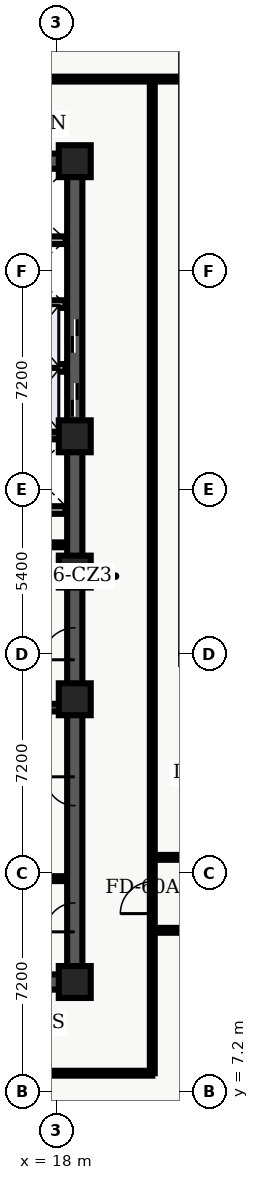
"""IFC4 building model, lengths in metres.
Left out: names, types, materials, properties, quantities, classifications, styles, units other than length and angle.
Written with IfcOpenShell. Run it as: python <this file> out.ifc"""

import sys

from ifc_helpers import new_model, entity, si_unit, converted_unit, direction, frame, origin_with_axes, origin_2d_with_axis, place, context, subcontext, project, spatial, polyline, rectangle, outline, extrude, element, fill, save


model = new_model("IFC4")
c1 = context("Model", 3, precision=1e-05, world=origin_with_axes(), true_north=direction((0.0, 1.0)))
c2 = subcontext(c1, "Body", "Model", "MODEL_VIEW")
j1 = project(units=[si_unit("LENGTHUNIT", "METRE"), converted_unit("PLANEANGLEUNIT", "DEGREE", entity("IfcPlaneAngleMeasure", 0.017), si_unit("PLANEANGLEUNIT", "RADIAN"), dimensions=[0, 0, 0, 0, 0, 0, 0])], contexts=[c1])
p1 = place(None, origin_with_axes())
s1 = spatial("IfcSite", under=j1, at=p1, CompositionType="ELEMENT")
p2 = place(p1, origin_with_axes())
s2 = spatial("IfcBuilding", under=s1, at=p2, CompositionType="ELEMENT")
p3 = place(p2, frame((0.0, 0.0, 148.5), z_axis=(0.0, 0.0, 1.0), x_axis=(1.0, 0.0, 0.0)))
s3 = spatial("IfcBuildingStorey", under=s2, at=p3, CompositionType="ELEMENT", Elevation=148.5)
p4 = place(p3, frame((11.4, 10.8, 0.0), z_axis=(0.0, 0.0, 1.0), x_axis=(1.0, 0.0, 0.0)))
e1 = element("IfcWall", 1, at=p4, inside=s3, PredefinedType="SHEAR", context=c2, shape_type="SweptSolid", body=[
    extrude(outline(polyline([(0.0, -0.25), (7.2, -0.25), (7.2, 0.25), (0.0, 0.25), (0.0, -0.25)])), origin_with_axes(), (0.0, 0.0, 1.0), 3.66),
])
p5 = place(p4, frame((2.625, 0.0, 0.0), z_axis=(0.0, 0.0, 1.0), x_axis=(1.0, 0.0, 0.0)))
e2 = element("IfcOpeningElement", 2, at=p5, cuts=e1, PredefinedType="OPENING", context=c2, shape_type="SweptSolid", body=[
    extrude(rectangle(XDim=1.05, YDim=0.52, at=origin_2d_with_axis()), origin_with_axes(), (0.0, 0.0, 1.0), 2.15),
])
p6 = place(p3, frame((11.4, 37.8, 0.0), z_axis=(0.0, 0.0, 1.0), x_axis=(1.0, 0.0, 0.0)))
e3 = element("IfcWall", 3, at=p6, inside=s3, PredefinedType="SHEAR", context=c2, shape_type="SweptSolid", body=[
    extrude(outline(polyline([(0.0, -0.25), (7.2, -0.25), (7.2, 0.25), (0.0, 0.25), (0.0, -0.25)])), origin_with_axes(), (0.0, 0.0, 1.0), 3.66),
])
p7 = place(p6, frame((2.625, 0.0, 0.0), z_axis=(0.0, 0.0, 1.0), x_axis=(1.0, 0.0, 0.0)))
e4 = element("IfcOpeningElement", 4, at=p7, cuts=e3, PredefinedType="OPENING", context=c2, shape_type="SweptSolid", body=[
    extrude(rectangle(XDim=1.05, YDim=0.52, at=origin_2d_with_axis()), origin_with_axes(), (0.0, 0.0, 1.0), 2.15),
])
p8 = place(p3, frame((18.6, 10.8, 0.0), z_axis=(0.0, 0.0, 1.0), x_axis=(0.0, 1.0, 0.0)))
e5 = element("IfcWall", 5, at=p8, inside=s3, PredefinedType="SHEAR", context=c2, shape_type="SweptSolid", body=[
    extrude(outline(polyline([(0.0, -0.25), (13.5, -0.25), (13.5, 0.25), (0.0, 0.25), (0.0, -0.25)])), origin_with_axes(), (0.0, 0.0, 1.0), 3.66),
])
p9 = place(p8, frame((11.125, 0.0, 0.0), z_axis=(0.0, 0.0, 1.0), x_axis=(1.0, 0.0, 0.0)))
e6 = element("IfcOpeningElement", 6, at=p9, cuts=e5, PredefinedType="OPENING", context=c2, shape_type="SweptSolid", body=[
    extrude(rectangle(XDim=1.05, YDim=0.52, at=origin_2d_with_axis()), origin_with_axes(), (0.0, 0.0, 1.0), 2.15),
])
p10 = place(p8, frame((2.125, 0.0, 0.0), z_axis=(0.0, 0.0, 1.0), x_axis=(1.0, 0.0, 0.0)))
e7 = element("IfcOpeningElement", 7, at=p10, cuts=e5, PredefinedType="OPENING", context=c2, shape_type="SweptSolid", body=[
    extrude(rectangle(XDim=0.95, YDim=0.52, at=origin_2d_with_axis()), origin_with_axes(), (0.0, 0.0, 1.0), 2.15),
])
p11 = place(p8, frame((6.275, 0.0, 0.0), z_axis=(0.0, 0.0, 1.0), x_axis=(1.0, 0.0, 0.0)))
e8 = element("IfcOpeningElement", 8, at=p11, cuts=e5, PredefinedType="OPENING", context=c2, shape_type="SweptSolid", body=[
    extrude(rectangle(XDim=0.95, YDim=0.52, at=origin_2d_with_axis()), origin_with_axes(), (0.0, 0.0, 1.0), 2.15),
])
p12 = place(p3, frame((18.6, 24.3, 0.0), z_axis=(0.0, 0.0, 1.0), x_axis=(0.0, 1.0, 0.0)))
e9 = element("IfcWall", 9, at=p12, inside=s3, PredefinedType="SHEAR", context=c2, shape_type="SweptSolid", body=[
    extrude(outline(polyline([(0.0, -0.25), (13.5, -0.25), (13.5, 0.25), (0.0, 0.25), (0.0, -0.25)])), origin_with_axes(), (0.0, 0.0, 1.0), 3.66),
])
p13 = place(p12, frame((5.65, 0.0, 0.0), z_axis=(0.0, 0.0, 1.0), x_axis=(1.0, 0.0, 0.0)))
e10 = element("IfcOpeningElement", 10, at=p13, cuts=e9, PredefinedType="OPENING", context=c2, shape_type="SweptSolid", body=[
    extrude(rectangle(XDim=1.1, YDim=0.52, at=origin_2d_with_axis()), origin_with_axes(), (0.0, 0.0, 1.0), 2.15),
])
p14 = place(p12, frame((7.75, 0.0, 0.0), z_axis=(0.0, 0.0, 1.0), x_axis=(1.0, 0.0, 0.0)))
e11 = element("IfcOpeningElement", 11, at=p14, cuts=e9, PredefinedType="OPENING", context=c2, shape_type="SweptSolid", body=[
    extrude(rectangle(XDim=1.1, YDim=0.52, at=origin_2d_with_axis()), origin_with_axes(), (0.0, 0.0, 1.0), 2.15),
])
for number, where, z_axis, x_axis in (
    (12, (11.65, 19.825, 0.0), (0.0, 0.0, 1.0), (1.0, 0.0, 0.0)),
    (13, (11.65, 28.775, 0.0), (0.0, 0.0, 1.0), (1.0, 0.0, 0.0)),
):
    element("IfcWall", number, at=place(p3, frame(where, z_axis=z_axis, x_axis=x_axis)), inside=s3, PredefinedType="SHEAR", context=c2, shape_type="SweptSolid", body=[
        extrude(outline(polyline([(0.0, -0.125), (6.7, -0.125), (6.7, 0.125), (0.0, 0.125), (0.0, -0.125)])), origin_with_axes(), (0.0, 0.0, 1.0), 3.66),
    ])
p15 = place(p3, frame((11.7, 24.1, 0.0), z_axis=(0.0, 0.0, 1.0), x_axis=(1.0, 0.0, 0.0)))
e14 = element("IfcWall", 14, at=p15, inside=s3, PredefinedType="SOLIDWALL", context=c2, shape_type="SweptSolid", body=[
    extrude(outline(polyline([(0.0, -0.125), (6.6, -0.125), (6.6, 0.125), (0.0, 0.125), (0.0, -0.125)])), origin_with_axes(), (0.0, 0.0, 1.0), 2.7),
])
p16 = place(p15, frame((3.75, 0.0, 0.0), z_axis=(0.0, 0.0, 1.0), x_axis=(1.0, 0.0, 0.0)))
e15 = element("IfcOpeningElement", 15, at=p16, cuts=e14, PredefinedType="OPENING", context=c2, shape_type="SweptSolid", body=[
    extrude(rectangle(XDim=0.9, YDim=0.27, at=origin_2d_with_axis()), origin_with_axes(), (0.0, 0.0, 1.0), 2.15),
])
p17 = place(p3, frame((11.7, 26.325, 0.0), z_axis=(0.0, 0.0, 1.0), x_axis=(1.0, 0.0, 0.0)))
e16 = element("IfcWall", 16, at=p17, inside=s3, PredefinedType="SOLIDWALL", context=c2, shape_type="SweptSolid", body=[
    extrude(outline(polyline([(0.0, -0.125), (6.6, -0.125), (6.6, 0.125), (0.0, 0.125), (0.0, -0.125)])), origin_with_axes(), (0.0, 0.0, 1.0), 2.7),
])
p18 = place(p17, frame((3.5, 0.0, 0.0), z_axis=(0.0, 0.0, 1.0), x_axis=(1.0, 0.0, 0.0)))
e17 = element("IfcOpeningElement", 17, at=p18, cuts=e16, PredefinedType="OPENING", context=c2, shape_type="SweptSolid", body=[
    extrude(rectangle(XDim=0.9, YDim=0.27, at=origin_2d_with_axis()), origin_with_axes(), (0.0, 0.0, 1.0), 2.15),
])
for number, where, z_axis, x_axis in (
    (18, (18.6, 10.8, 0.0), (0.0, 0.0, 1.0), (1.0, 0.0, 0.0)),
    (19, (18.6, 20.1, 0.0), (0.0, 0.0, 1.0), (1.0, 0.0, 0.0)),
    (20, (18.6, 24.3, 0.0), (0.0, 0.0, 1.0), (1.0, 0.0, 0.0)),
    (21, (18.6, 28.75, 0.0), (0.0, 0.0, 1.0), (1.0, 0.0, 0.0)),
    (22, (18.6, 37.8, 0.0), (0.0, 0.0, 1.0), (1.0, 0.0, 0.0)),
):
    element("IfcColumn", number, at=place(p3, frame(where, z_axis=z_axis, x_axis=x_axis)), inside=s3, PredefinedType="COLUMN", context=c2, shape_type="SweptSolid", body=[
        extrude(rectangle(XDim=1.05, YDim=1.05, at=origin_2d_with_axis()), origin_with_axes(), (0.0, 0.0, 1.0), 3.9),
    ])
p19 = place(p3, frame((14.62, 25.18, 0.0), z_axis=(0.0, 0.0, 1.0), x_axis=(1.0, 0.0, 0.0)))
e23 = element("IfcWall", 23, at=p19, inside=s3, PredefinedType="PARTITIONING", context=c2, shape_type="SweptSolid", body=[
    extrude(outline(polyline([(0.0, -0.08), (3.68, -0.08), (3.68, 0.08), (0.0, 0.08), (0.0, -0.08)])), origin_with_axes(), (0.0, 0.0, 1.0), 2.7),
])
p20 = place(p19, frame((1.95, 0.0, 0.0), z_axis=(0.0, 0.0, 1.0), x_axis=(1.0, 0.0, 0.0)))
e24 = element("IfcOpeningElement", 24, at=p20, cuts=e23, PredefinedType="OPENING", context=c2, shape_type="SweptSolid", body=[
    extrude(rectangle(XDim=0.9, YDim=0.18, at=origin_2d_with_axis()), origin_with_axes(), (0.0, 0.0, 1.0), 2.15),
])
p21 = place(p3, frame((15.84, 14.2, 0.0), z_axis=(0.0, 0.0, 1.0), x_axis=(1.0, 0.0, 0.0)))
e25 = element("IfcWall", 25, at=p21, inside=s3, PredefinedType="PARTITIONING", context=c2, shape_type="SweptSolid", body=[
    extrude(outline(polyline([(0.0, -0.08), (2.46, -0.08), (2.46, 0.08), (0.0, 0.08), (0.0, -0.08)])), origin_with_axes(), (0.0, 0.0, 1.0), 2.7),
])
for number, where, z_axis, x_axis in (
    (26, (15.84, 31.0, 0.0), (0.0, 0.0, 1.0), (1.0, 0.0, 0.0)),
    (27, (15.84, 33.1, 0.0), (0.0, 0.0, 1.0), (1.0, 0.0, 0.0)),
    (28, (15.84, 35.2, 0.0), (0.0, 0.0, 1.0), (1.0, 0.0, 0.0)),
):
    element("IfcWall", number, at=place(p3, frame(where, z_axis=z_axis, x_axis=x_axis)), inside=s3, PredefinedType="SOLIDWALL", context=c2, shape_type="SweptSolid", body=[
        extrude(outline(polyline([(0.0, -0.125), (2.46, -0.125), (2.46, 0.125), (0.0, 0.125), (0.0, -0.125)])), origin_with_axes(), (0.0, 0.0, 1.0), 2.7),
    ])
p22 = place(p3, frame((2.6, 7.8, 0.0), z_axis=(0.0, 0.0, 1.0), x_axis=(1.0, 0.0, 0.0)))
e29 = element("IfcWall", 29, at=p22, inside=s3, PredefinedType="PARTITIONING", context=c2, shape_type="SweptSolid", body=[
    extrude(outline(polyline([(0.0, -0.08), (18.55, -0.08), (18.55, 0.08), (0.0, 0.08), (0.0, -0.08)])), origin_with_axes(), (0.0, 0.0, 1.0), 2.7),
])
p23 = place(p22, frame((3.737, 0.0, 0.0), z_axis=(0.0, 0.0, 1.0), x_axis=(1.0, 0.0, 0.0)))
e30 = element("IfcOpeningElement", 30, at=p23, cuts=e29, PredefinedType="OPENING", context=c2, shape_type="SweptSolid", body=[
    extrude(rectangle(XDim=1.0, YDim=0.18, at=origin_2d_with_axis()), origin_with_axes(), (0.0, 0.0, 1.0), 2.15),
])
p24 = place(p22, frame((13.273, 0.0, 0.0), z_axis=(0.0, 0.0, 1.0), x_axis=(1.0, 0.0, 0.0)))
e31 = element("IfcOpeningElement", 31, at=p24, cuts=e29, PredefinedType="OPENING", context=c2, shape_type="SweptSolid", body=[
    extrude(rectangle(XDim=1.0, YDim=0.18, at=origin_2d_with_axis()), origin_with_axes(), (0.0, 0.0, 1.0), 2.15),
])
p25 = place(p3, frame((2.6, 40.5, 0.0), z_axis=(0.0, 0.0, 1.0), x_axis=(1.0, 0.0, 0.0)))
e32 = element("IfcWall", 32, at=p25, inside=s3, PredefinedType="PARTITIONING", context=c2, shape_type="SweptSolid", body=[
    extrude(outline(polyline([(0.0, -0.08), (19.506, -0.08), (19.506, 0.08), (0.0, 0.08), (0.0, -0.08)])), origin_with_axes(), (0.0, 0.0, 1.0), 2.7),
])
p26 = place(p25, frame((1.675, 0.0, 0.0), z_axis=(0.0, 0.0, 1.0), x_axis=(1.0, 0.0, 0.0)))
e33 = element("IfcOpeningElement", 33, at=p26, cuts=e32, PredefinedType="OPENING", context=c2, shape_type="SweptSolid", body=[
    extrude(rectangle(XDim=1.0, YDim=0.18, at=origin_2d_with_axis()), origin_with_axes(), (0.0, 0.0, 1.0), 2.15),
])
p27 = place(p25, frame((7.731, 0.0, 0.0), z_axis=(0.0, 0.0, 1.0), x_axis=(1.0, 0.0, 0.0)))
e34 = element("IfcOpeningElement", 34, at=p27, cuts=e32, PredefinedType="OPENING", context=c2, shape_type="SweptSolid", body=[
    extrude(rectangle(XDim=1.0, YDim=0.18, at=origin_2d_with_axis()), origin_with_axes(), (0.0, 0.0, 1.0), 2.15),
])
p28 = place(p25, frame((10.722, 0.0, 0.0), z_axis=(0.0, 0.0, 1.0), x_axis=(1.0, 0.0, 0.0)))
e35 = element("IfcOpeningElement", 35, at=p28, cuts=e32, PredefinedType="OPENING", context=c2, shape_type="SweptSolid", body=[
    extrude(rectangle(XDim=1.0, YDim=0.18, at=origin_2d_with_axis()), origin_with_axes(), (0.0, 0.0, 1.0), 2.15),
])
p29 = place(p25, frame((13.851, 0.0, 0.0), z_axis=(0.0, 0.0, 1.0), x_axis=(1.0, 0.0, 0.0)))
e36 = element("IfcOpeningElement", 36, at=p29, cuts=e32, PredefinedType="OPENING", context=c2, shape_type="SweptSolid", body=[
    extrude(rectangle(XDim=1.0, YDim=0.18, at=origin_2d_with_axis()), origin_with_axes(), (0.0, 0.0, 1.0), 2.15),
])
p30 = place(p3, frame((21.15, 7.8, 0.0), z_axis=(0.0, 0.0, 1.0), x_axis=(0.0, 1.0, 0.0)))
e37 = element("IfcWall", 37, at=p30, inside=s3, PredefinedType="PARTITIONING", context=c2, shape_type="SweptSolid", body=[
    extrude(outline(polyline([(0.0, -0.08), (32.7, -0.08), (32.7, 0.08), (0.0, 0.08), (0.0, -0.08)])), origin_with_axes(), (0.0, 0.0, 1.0), 2.7),
])
p31 = place(p30, frame((5.775, 0.0, 0.0), z_axis=(0.0, 0.0, 1.0), x_axis=(1.0, 0.0, 0.0)))
e38 = element("IfcOpeningElement", 38, at=p31, cuts=e37, PredefinedType="OPENING", context=c2, shape_type="SweptSolid", body=[
    extrude(rectangle(XDim=1.05, YDim=0.18, at=origin_2d_with_axis()), origin_with_axes(), (0.0, 0.0, 1.0), 2.15),
])
p32 = place(p3, frame((21.15, 12.5, 0.0), z_axis=(0.0, 0.0, 1.0), x_axis=(1.0, 0.0, 0.0)))
e39 = element("IfcWall", 39, at=p32, inside=s3, PredefinedType="PARTITIONING", context=c2, shape_type="SweptSolid", body=[
    extrude(outline(polyline([(0.0, -0.08), (15.2, -0.08), (15.2, 0.08), (0.0, 0.08), (0.0, -0.08)])), origin_with_axes(), (0.0, 0.0, 1.0), 2.7),
])
p33 = place(p32, frame((2.276, 0.0, 0.0), z_axis=(0.0, 0.0, 1.0), x_axis=(1.0, 0.0, 0.0)))
e40 = element("IfcOpeningElement", 40, at=p33, cuts=e39, PredefinedType="OPENING", context=c2, shape_type="SweptSolid", body=[
    extrude(rectangle(XDim=1.0, YDim=0.18, at=origin_2d_with_axis()), origin_with_axes(), (0.0, 0.0, 1.0), 2.15),
])
p34 = place(p32, frame((6.824, 0.0, 0.0), z_axis=(0.0, 0.0, 1.0), x_axis=(1.0, 0.0, 0.0)))
e41 = element("IfcOpeningElement", 41, at=p34, cuts=e39, PredefinedType="OPENING", context=c2, shape_type="SweptSolid", body=[
    extrude(rectangle(XDim=1.0, YDim=0.18, at=origin_2d_with_axis()), origin_with_axes(), (0.0, 0.0, 1.0), 2.15),
])
p35 = place(p32, frame((12.198, 0.0, 0.0), z_axis=(0.0, 0.0, 1.0), x_axis=(1.0, 0.0, 0.0)))
e42 = element("IfcOpeningElement", 42, at=p35, cuts=e39, PredefinedType="OPENING", context=c2, shape_type="SweptSolid", body=[
    extrude(rectangle(XDim=1.2, YDim=0.18, at=origin_2d_with_axis()), origin_with_axes(), (0.0, 0.0, 1.0), 2.2),
])
p36 = place(p3, frame((21.15, 14.9, 0.0), z_axis=(0.0, 0.0, 1.0), x_axis=(1.0, 0.0, 0.0)))
e43 = element("IfcWall", 43, at=p36, inside=s3, PredefinedType="PARTITIONING", context=c2, shape_type="SweptSolid", body=[
    extrude(outline(polyline([(0.0, -0.08), (15.2, -0.08), (15.2, 0.08), (0.0, 0.08), (0.0, -0.08)])), origin_with_axes(), (0.0, 0.0, 1.0), 2.7),
])
p37 = place(p36, frame((3.506, 0.0, 0.0), z_axis=(0.0, 0.0, 1.0), x_axis=(1.0, 0.0, 0.0)))
e44 = element("IfcOpeningElement", 44, at=p37, cuts=e43, PredefinedType="OPENING", context=c2, shape_type="SweptSolid", body=[
    extrude(rectangle(XDim=1.0, YDim=0.18, at=origin_2d_with_axis()), origin_with_axes(), (0.0, 0.0, 1.0), 2.15),
])
p38 = place(p36, frame((10.976, 0.0, 0.0), z_axis=(0.0, 0.0, 1.0), x_axis=(1.0, 0.0, 0.0)))
e45 = element("IfcOpeningElement", 45, at=p38, cuts=e43, PredefinedType="OPENING", context=c2, shape_type="SweptSolid", body=[
    extrude(rectangle(XDim=1.0, YDim=0.18, at=origin_2d_with_axis()), origin_with_axes(), (0.0, 0.0, 1.0), 2.15),
])
p39 = place(p12, frame((5.65, 0.0, 0.0), z_axis=(0.0, 0.0, 1.0), x_axis=(1.0, 0.0, 0.0)))
e46 = element("IfcDoor", 46, at=p39, inside=s3, OperationType="SLIDING_TO_LEFT", PredefinedType="DOOR", context=c2, shape_type="SweptSolid", body=[
    extrude(rectangle(XDim=1.1, YDim=0.09, at=origin_2d_with_axis()), origin_with_axes(), (0.0, 0.0, 1.0), 2.15),
])
fill(e10, e46)
p40 = place(p12, frame((7.75, 0.0, 0.0), z_axis=(0.0, 0.0, 1.0), x_axis=(1.0, 0.0, 0.0)))
e47 = element("IfcDoor", 47, at=p40, inside=s3, OperationType="SLIDING_TO_RIGHT", PredefinedType="DOOR", context=c2, shape_type="SweptSolid", body=[
    extrude(rectangle(XDim=1.1, YDim=0.09, at=origin_2d_with_axis()), origin_with_axes(), (0.0, 0.0, 1.0), 2.15),
])
fill(e11, e47)
p41 = place(p8, frame((11.125, 0.0, 0.0), z_axis=(0.0, 0.0, 1.0), x_axis=(1.0, 0.0, 0.0)))
e48 = element("IfcDoor", 48, at=p41, inside=s3, OperationType="SINGLE_SWING_LEFT", PredefinedType="DOOR", context=c2, shape_type="SweptSolid", body=[
    extrude(rectangle(XDim=1.05, YDim=0.09, at=origin_2d_with_axis()), origin_with_axes(), (0.0, 0.0, 1.0), 2.15),
])
fill(e6, e48)
p42 = place(p8, frame((2.125, 0.0, 0.0), z_axis=(0.0, 0.0, 1.0), x_axis=(1.0, 0.0, 0.0)))
e49 = element("IfcDoor", 49, at=p42, inside=s3, OperationType="SINGLE_SWING_LEFT", PredefinedType="DOOR", context=c2, shape_type="SweptSolid", body=[
    extrude(rectangle(XDim=0.95, YDim=0.09, at=origin_2d_with_axis()), origin_with_axes(), (0.0, 0.0, 1.0), 2.15),
])
fill(e7, e49)
p43 = place(p8, frame((6.275, 0.0, 0.0), z_axis=(0.0, 0.0, 1.0), x_axis=(1.0, 0.0, 0.0)))
e50 = element("IfcDoor", 50, at=p43, inside=s3, OperationType="SINGLE_SWING_RIGHT", PredefinedType="DOOR", context=c2, shape_type="SweptSolid", body=[
    extrude(rectangle(XDim=0.95, YDim=0.09, at=origin_2d_with_axis()), origin_with_axes(), (0.0, 0.0, 1.0), 2.15),
])
fill(e8, e50)
p44 = place(p30, frame((5.775, 0.0, 0.0), z_axis=(0.0, 0.0, 1.0), x_axis=(1.0, 0.0, 0.0)))
e51 = element("IfcDoor", 51, at=p44, inside=s3, OperationType="SINGLE_SWING_LEFT", PredefinedType="DOOR", context=c2, shape_type="SweptSolid", body=[
    extrude(rectangle(XDim=1.05, YDim=0.09, at=origin_2d_with_axis()), origin_with_axes(), (0.0, 0.0, 1.0), 2.15),
])
fill(e38, e51)
save(model, sys.argv[1])
